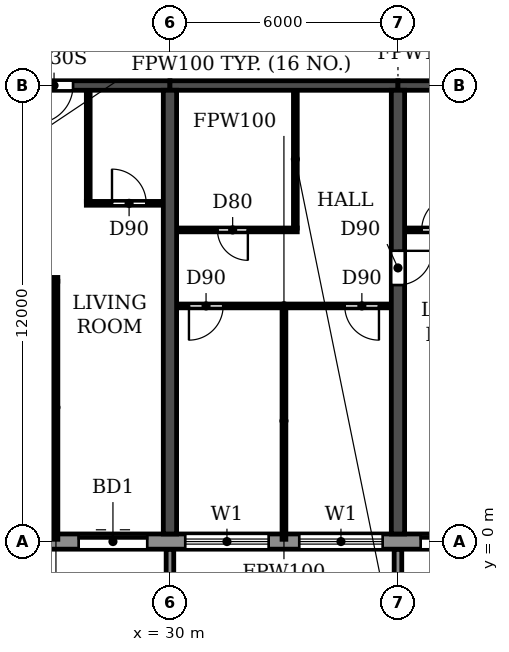
"""IFC4 building model, lengths in metres.
Left out: names, types, materials, properties, quantities, classifications, styles, units other than length and angle.
Written with IfcOpenShell. Run it as: python <this file> out.ifc"""

import sys

from ifc_helpers import new_model, si_unit, direction, frame, frame_2d, origin, place, context, subcontext, project, spatial, polyline, rectangle, outline, extrude, source, transform, mapped, element, fill, save


model = new_model("IFC4")
c1 = context("Model", 3, precision=1e-05, world=origin(), true_north=direction((0.0, 1.0)))
c2 = subcontext(c1, "Body", "Model", "MODEL_VIEW")
j1 = project(units=[si_unit("LENGTHUNIT", "METRE"), si_unit("PLANEANGLEUNIT", "RADIAN")], contexts=[c1])
p1 = place(None, origin())
s1 = spatial("IfcSite", under=j1, at=p1, CompositionType="ELEMENT")
p2 = place(p1, origin())
s2 = spatial("IfcBuilding", under=s1, at=p2, CompositionType="ELEMENT")
p3 = place(p2, frame((0.0, 0.0, 72.9)))
s3 = spatial("IfcBuildingStorey", under=s2, at=p3, CompositionType="ELEMENT", Elevation=72.9)
p4 = place(p3, frame((30.0, 0.2, 0.0), z_axis=(0.0, 0.0, 1.0), x_axis=(0.0, 1.0, 0.0)))
e1 = element("IfcWall", 1, at=p4, inside=s3, PredefinedType="SHEAR", context=c2, shape_type="SweptSolid", body=[
    extrude(rectangle(XDim=11.675, YDim=0.35, at=frame_2d((5.837, 0.0))), origin(), (0.0, 0.0, 1.0), 3.06),
])
p5 = place(p3, frame((36.0, 0.2, 0.0), z_axis=(0.0, 0.0, 1.0), x_axis=(0.0, 1.0, 0.0)))
e2 = element("IfcWall", 2, at=p5, inside=s3, PredefinedType="SHEAR", context=c2, shape_type="SweptSolid", body=[
    extrude(rectangle(XDim=11.675, YDim=0.35, at=frame_2d((5.837, 0.0))), origin(), (0.0, 0.0, 1.0), 3.06),
])
p6 = place(p5, frame((6.55, 0.0, 0.0)))
e3 = element("IfcOpeningElement", 3, at=p6, cuts=e2, PredefinedType="OPENING", context=c2, shape_type="SweptSolid", body=[
    extrude(rectangle(XDim=0.9, YDim=2.1, at=frame_2d((0.45, 1.05))), frame((0.0, 0.185, 0.0), z_axis=(0.0, -1.0, 0.0), x_axis=(1.0, 0.0, 0.0)), (0.0, 0.0, 1.0), 0.37),
])
p7 = place(p3, frame((24.0, 12.0, 0.0), z_axis=(0.0, 0.0, 1.0), x_axis=(1.0, 0.0, 0.0)))
e4 = element("IfcWall", 4, at=p7, inside=s3, PredefinedType="SHEAR", context=c2, shape_type="SweptSolid", body=[
    extrude(rectangle(XDim=6.0, YDim=0.25, at=frame_2d((3.0, 0.0))), origin(), (0.0, 0.0, 1.0), 2.46),
])
p8 = place(p7, frame((2.45, 0.0, 0.0)))
e5 = element("IfcOpeningElement", 5, at=p8, cuts=e4, PredefinedType="OPENING", context=c2, shape_type="SweptSolid", body=[
    extrude(rectangle(XDim=1.0, YDim=2.1, at=frame_2d((0.5, 1.05))), frame((0.0, 0.135, 0.0), z_axis=(0.0, -1.0, 0.0), x_axis=(1.0, 0.0, 0.0)), (0.0, 0.0, 1.0), 0.27),
])
p9 = place(p3, frame((30.0, 12.0, 0.0), z_axis=(0.0, 0.0, 1.0), x_axis=(1.0, 0.0, 0.0)))
e6 = element("IfcWall", 6, at=p9, inside=s3, PredefinedType="SHEAR", context=c2, shape_type="SweptSolid", body=[
    extrude(rectangle(XDim=6.0, YDim=0.25, at=frame_2d((3.0, 0.0))), origin(), (0.0, 0.0, 1.0), 2.46),
])
p10 = place(p3, frame((36.0, 12.0, 0.0), z_axis=(0.0, 0.0, 1.0), x_axis=(1.0, 0.0, 0.0)))
e7 = element("IfcWall", 7, at=p10, inside=s3, PredefinedType="SHEAR", context=c2, shape_type="SweptSolid", body=[
    extrude(rectangle(XDim=6.0, YDim=0.25, at=frame_2d((3.0, 0.0))), origin(), (0.0, 0.0, 1.0), 2.46),
])
p11 = place(p10, frame((2.55, 0.0, 0.0)))
e8 = element("IfcOpeningElement", 8, at=p11, cuts=e7, PredefinedType="OPENING", context=c2, shape_type="SweptSolid", body=[
    extrude(rectangle(XDim=1.0, YDim=2.1, at=frame_2d((0.5, 1.05))), frame((0.0, 0.135, 0.0), z_axis=(0.0, -1.0, 0.0), x_axis=(1.0, 0.0, 0.0)), (0.0, 0.0, 1.0), 0.27),
])
p12 = place(p3, frame((10.683, 0.0, 0.0), z_axis=(0.0, 0.0, 1.0), x_axis=(1.0, 0.0, 0.0)))
e9 = element("IfcWall", 9, at=p12, inside=s3, PredefinedType="STANDARD", context=c2, shape_type="SweptSolid", body=[
    extrude(rectangle(XDim=80.634, YDim=0.4, at=frame_2d((40.317, 0.0))), origin(), (0.0, 0.0, 1.0), 3.06),
])
p13 = place(p12, frame((1.717, 0.0, 0.9)))
e10 = element("IfcOpeningElement", 10, at=p13, cuts=e9, PredefinedType="OPENING", context=c2, shape_type="SweptSolid", body=[
    extrude(rectangle(XDim=2.2, YDim=1.5, at=frame_2d((1.1, 0.75))), frame((0.0, 0.21, 0.0), z_axis=(0.0, -1.0, 0.0), x_axis=(1.0, 0.0, 0.0)), (0.0, 0.0, 1.0), 0.42),
])
p14 = place(p12, frame((4.917, 0.0, 0.0)))
e11 = element("IfcOpeningElement", 11, at=p14, cuts=e9, PredefinedType="OPENING", context=c2, shape_type="SweptSolid", body=[
    extrude(rectangle(XDim=1.8, YDim=2.4, at=frame_2d((0.9, 1.2))), frame((0.0, 0.21, 0.0), z_axis=(0.0, -1.0, 0.0), x_axis=(1.0, 0.0, 0.0)), (0.0, 0.0, 1.0), 0.42),
])
p15 = place(p12, frame((7.717, 0.0, 0.9)))
e12 = element("IfcOpeningElement", 12, at=p15, cuts=e9, PredefinedType="OPENING", context=c2, shape_type="SweptSolid", body=[
    extrude(rectangle(XDim=2.2, YDim=1.5, at=frame_2d((1.1, 0.75))), frame((0.0, 0.21, 0.0), z_axis=(0.0, -1.0, 0.0), x_axis=(1.0, 0.0, 0.0)), (0.0, 0.0, 1.0), 0.42),
])
p16 = place(p12, frame((10.717, 0.0, 0.9)))
e13 = element("IfcOpeningElement", 13, at=p16, cuts=e9, PredefinedType="OPENING", context=c2, shape_type="SweptSolid", body=[
    extrude(rectangle(XDim=2.2, YDim=1.5, at=frame_2d((1.1, 0.75))), frame((0.0, 0.21, 0.0), z_axis=(0.0, -1.0, 0.0), x_axis=(1.0, 0.0, 0.0)), (0.0, 0.0, 1.0), 0.42),
])
p17 = place(p12, frame((13.717, 0.0, 0.9)))
e14 = element("IfcOpeningElement", 14, at=p17, cuts=e9, PredefinedType="OPENING", context=c2, shape_type="SweptSolid", body=[
    extrude(rectangle(XDim=2.2, YDim=1.5, at=frame_2d((1.1, 0.75))), frame((0.0, 0.21, 0.0), z_axis=(0.0, -1.0, 0.0), x_axis=(1.0, 0.0, 0.0)), (0.0, 0.0, 1.0), 0.42),
])
p18 = place(p12, frame((16.917, 0.0, 0.0)))
e15 = element("IfcOpeningElement", 15, at=p18, cuts=e9, PredefinedType="OPENING", context=c2, shape_type="SweptSolid", body=[
    extrude(rectangle(XDim=1.8, YDim=2.4, at=frame_2d((0.9, 1.2))), frame((0.0, 0.21, 0.0), z_axis=(0.0, -1.0, 0.0), x_axis=(1.0, 0.0, 0.0)), (0.0, 0.0, 1.0), 0.42),
])
p19 = place(p12, frame((19.717, 0.0, 0.9)))
e16 = element("IfcOpeningElement", 16, at=p19, cuts=e9, PredefinedType="OPENING", context=c2, shape_type="SweptSolid", body=[
    extrude(rectangle(XDim=2.2, YDim=1.5, at=frame_2d((1.1, 0.75))), frame((0.0, 0.21, 0.0), z_axis=(0.0, -1.0, 0.0), x_axis=(1.0, 0.0, 0.0)), (0.0, 0.0, 1.0), 0.42),
])
p20 = place(p12, frame((22.717, 0.0, 0.9)))
e17 = element("IfcOpeningElement", 17, at=p20, cuts=e9, PredefinedType="OPENING", context=c2, shape_type="SweptSolid", body=[
    extrude(rectangle(XDim=2.2, YDim=1.5, at=frame_2d((1.1, 0.75))), frame((0.0, 0.21, 0.0), z_axis=(0.0, -1.0, 0.0), x_axis=(1.0, 0.0, 0.0)), (0.0, 0.0, 1.0), 0.42),
])
p21 = place(p12, frame((25.917, 0.0, 0.0)))
e18 = element("IfcOpeningElement", 18, at=p21, cuts=e9, PredefinedType="OPENING", context=c2, shape_type="SweptSolid", body=[
    extrude(rectangle(XDim=1.8, YDim=2.4, at=frame_2d((0.9, 1.2))), frame((0.0, 0.21, 0.0), z_axis=(0.0, -1.0, 0.0), x_axis=(1.0, 0.0, 0.0)), (0.0, 0.0, 1.0), 0.42),
])
p22 = place(p12, frame((28.717, 0.0, 0.9)))
e19 = element("IfcOpeningElement", 19, at=p22, cuts=e9, PredefinedType="OPENING", context=c2, shape_type="SweptSolid", body=[
    extrude(rectangle(XDim=2.2, YDim=1.5, at=frame_2d((1.1, 0.75))), frame((0.0, 0.21, 0.0), z_axis=(0.0, -1.0, 0.0), x_axis=(1.0, 0.0, 0.0)), (0.0, 0.0, 1.0), 0.42),
])
p23 = place(p12, frame((31.717, 0.0, 0.9)))
e20 = element("IfcOpeningElement", 20, at=p23, cuts=e9, PredefinedType="OPENING", context=c2, shape_type="SweptSolid", body=[
    extrude(rectangle(XDim=2.2, YDim=1.5, at=frame_2d((1.1, 0.75))), frame((0.0, 0.21, 0.0), z_axis=(0.0, -1.0, 0.0), x_axis=(1.0, 0.0, 0.0)), (0.0, 0.0, 1.0), 0.42),
])
p24 = place(p12, frame((34.717, 0.0, 0.9)))
e21 = element("IfcOpeningElement", 21, at=p24, cuts=e9, PredefinedType="OPENING", context=c2, shape_type="SweptSolid", body=[
    extrude(rectangle(XDim=2.2, YDim=1.5, at=frame_2d((1.1, 0.75))), frame((0.0, 0.21, 0.0), z_axis=(0.0, -1.0, 0.0), x_axis=(1.0, 0.0, 0.0)), (0.0, 0.0, 1.0), 0.42),
])
p25 = place(p12, frame((37.917, 0.0, 0.0)))
e22 = element("IfcOpeningElement", 22, at=p25, cuts=e9, PredefinedType="OPENING", context=c2, shape_type="SweptSolid", body=[
    extrude(rectangle(XDim=1.8, YDim=2.4, at=frame_2d((0.9, 1.2))), frame((0.0, 0.21, 0.0), z_axis=(0.0, -1.0, 0.0), x_axis=(1.0, 0.0, 0.0)), (0.0, 0.0, 1.0), 0.42),
])
p26 = place(p12, frame((40.717, 0.0, 0.9)))
e23 = element("IfcOpeningElement", 23, at=p26, cuts=e9, PredefinedType="OPENING", context=c2, shape_type="SweptSolid", body=[
    extrude(rectangle(XDim=2.2, YDim=1.5, at=frame_2d((1.1, 0.75))), frame((0.0, 0.21, 0.0), z_axis=(0.0, -1.0, 0.0), x_axis=(1.0, 0.0, 0.0)), (0.0, 0.0, 1.0), 0.42),
])
p27 = place(p12, frame((43.717, 0.0, 0.9)))
e24 = element("IfcOpeningElement", 24, at=p27, cuts=e9, PredefinedType="OPENING", context=c2, shape_type="SweptSolid", body=[
    extrude(rectangle(XDim=2.2, YDim=1.5, at=frame_2d((1.1, 0.75))), frame((0.0, 0.21, 0.0), z_axis=(0.0, -1.0, 0.0), x_axis=(1.0, 0.0, 0.0)), (0.0, 0.0, 1.0), 0.42),
])
p28 = place(p12, frame((46.717, 0.0, 0.9)))
e25 = element("IfcOpeningElement", 25, at=p28, cuts=e9, PredefinedType="OPENING", context=c2, shape_type="SweptSolid", body=[
    extrude(rectangle(XDim=2.2, YDim=1.5, at=frame_2d((1.1, 0.75))), frame((0.0, 0.21, 0.0), z_axis=(0.0, -1.0, 0.0), x_axis=(1.0, 0.0, 0.0)), (0.0, 0.0, 1.0), 0.42),
])
p29 = place(p12, frame((49.917, 0.0, 0.0)))
e26 = element("IfcOpeningElement", 26, at=p29, cuts=e9, PredefinedType="OPENING", context=c2, shape_type="SweptSolid", body=[
    extrude(rectangle(XDim=1.8, YDim=2.4, at=frame_2d((0.9, 1.2))), frame((0.0, 0.21, 0.0), z_axis=(0.0, -1.0, 0.0), x_axis=(1.0, 0.0, 0.0)), (0.0, 0.0, 1.0), 0.42),
])
p30 = place(p12, frame((52.717, 0.0, 0.9)))
e27 = element("IfcOpeningElement", 27, at=p30, cuts=e9, PredefinedType="OPENING", context=c2, shape_type="SweptSolid", body=[
    extrude(rectangle(XDim=2.2, YDim=1.5, at=frame_2d((1.1, 0.75))), frame((0.0, 0.21, 0.0), z_axis=(0.0, -1.0, 0.0), x_axis=(1.0, 0.0, 0.0)), (0.0, 0.0, 1.0), 0.42),
])
p31 = place(p12, frame((55.717, 0.0, 0.9)))
e28 = element("IfcOpeningElement", 28, at=p31, cuts=e9, PredefinedType="OPENING", context=c2, shape_type="SweptSolid", body=[
    extrude(rectangle(XDim=2.2, YDim=1.5, at=frame_2d((1.1, 0.75))), frame((0.0, 0.21, 0.0), z_axis=(0.0, -1.0, 0.0), x_axis=(1.0, 0.0, 0.0)), (0.0, 0.0, 1.0), 0.42),
])
p32 = place(p12, frame((58.717, 0.0, 0.9)))
e29 = element("IfcOpeningElement", 29, at=p32, cuts=e9, PredefinedType="OPENING", context=c2, shape_type="SweptSolid", body=[
    extrude(rectangle(XDim=2.2, YDim=1.5, at=frame_2d((1.1, 0.75))), frame((0.0, 0.21, 0.0), z_axis=(0.0, -1.0, 0.0), x_axis=(1.0, 0.0, 0.0)), (0.0, 0.0, 1.0), 0.42),
])
p33 = place(p12, frame((61.717, 0.0, 0.9)))
e30 = element("IfcOpeningElement", 30, at=p33, cuts=e9, PredefinedType="OPENING", context=c2, shape_type="SweptSolid", body=[
    extrude(rectangle(XDim=2.2, YDim=1.5, at=frame_2d((1.1, 0.75))), frame((0.0, 0.21, 0.0), z_axis=(0.0, -1.0, 0.0), x_axis=(1.0, 0.0, 0.0)), (0.0, 0.0, 1.0), 0.42),
])
p34 = place(p12, frame((64.917, 0.0, 0.0)))
e31 = element("IfcOpeningElement", 31, at=p34, cuts=e9, PredefinedType="OPENING", context=c2, shape_type="SweptSolid", body=[
    extrude(rectangle(XDim=1.8, YDim=2.4, at=frame_2d((0.9, 1.2))), frame((0.0, 0.21, 0.0), z_axis=(0.0, -1.0, 0.0), x_axis=(1.0, 0.0, 0.0)), (0.0, 0.0, 1.0), 0.42),
])
p35 = place(p12, frame((67.717, 0.0, 0.9)))
e32 = element("IfcOpeningElement", 32, at=p35, cuts=e9, PredefinedType="OPENING", context=c2, shape_type="SweptSolid", body=[
    extrude(rectangle(XDim=2.2, YDim=1.5, at=frame_2d((1.1, 0.75))), frame((0.0, 0.21, 0.0), z_axis=(0.0, -1.0, 0.0), x_axis=(1.0, 0.0, 0.0)), (0.0, 0.0, 1.0), 0.42),
])
p36 = place(p12, frame((70.717, 0.0, 0.9)))
e33 = element("IfcOpeningElement", 33, at=p36, cuts=e9, PredefinedType="OPENING", context=c2, shape_type="SweptSolid", body=[
    extrude(rectangle(XDim=2.2, YDim=1.5, at=frame_2d((1.1, 0.75))), frame((0.0, 0.21, 0.0), z_axis=(0.0, -1.0, 0.0), x_axis=(1.0, 0.0, 0.0)), (0.0, 0.0, 1.0), 0.42),
])
p37 = place(p12, frame((73.917, 0.0, 0.0)))
e34 = element("IfcOpeningElement", 34, at=p37, cuts=e9, PredefinedType="OPENING", context=c2, shape_type="SweptSolid", body=[
    extrude(rectangle(XDim=1.8, YDim=2.4, at=frame_2d((0.9, 1.2))), frame((0.0, 0.21, 0.0), z_axis=(0.0, -1.0, 0.0), x_axis=(1.0, 0.0, 0.0)), (0.0, 0.0, 1.0), 0.42),
])
p38 = place(p12, frame((76.717, 0.0, 0.9)))
e35 = element("IfcOpeningElement", 35, at=p38, cuts=e9, PredefinedType="OPENING", context=c2, shape_type="SweptSolid", body=[
    extrude(rectangle(XDim=2.2, YDim=1.5, at=frame_2d((1.1, 0.75))), frame((0.0, 0.21, 0.0), z_axis=(0.0, -1.0, 0.0), x_axis=(1.0, 0.0, 0.0)), (0.0, 0.0, 1.0), 0.42),
])
m1 = source(origin(), c2, "Body", "SweptSolid", [
    extrude(outline(polyline([(0.0, 0.0), (0.2, 0.0), (0.2, 1.65), (0.0, 1.65), (0.0, 0.0)])), origin(), (0.0, 0.0, 1.0), 3.1),
])
for number, where in (
    (36, (29.9, -1.85, 0.0)),
    (37, (35.9, -1.85, 0.0)),
):
    element("IfcWall", number, at=place(p3, frame(where)), inside=s3, PredefinedType="STANDARD", context=c2, shape_type="MappedRepresentation", body=[
        mapped(m1, transform((0.0, 0.0, 0.0))),
    ])
p39 = place(p3, frame((30.185, 6.2, 0.0), z_axis=(0.0, 0.0, 1.0), x_axis=(1.0, 0.0, 0.0)))
e38 = element("IfcWall", 38, at=p39, inside=s3, PredefinedType="PARTITIONING", context=c2, shape_type="SweptSolid", body=[
    extrude(rectangle(XDim=5.63, YDim=0.1, at=frame_2d((2.815, 0.0))), origin(), (0.0, 0.0, 1.0), 3.06),
])
p40 = place(p39, frame((0.315, 0.0, 0.0)))
e39 = element("IfcOpeningElement", 39, at=p40, cuts=e38, PredefinedType="OPENING", context=c2, shape_type="SweptSolid", body=[
    extrude(rectangle(XDim=0.9, YDim=2.1, at=frame_2d((0.45, 1.05))), frame((0.0, 0.06, 0.0), z_axis=(0.0, -1.0, 0.0), x_axis=(1.0, 0.0, 0.0)), (0.0, 0.0, 1.0), 0.12),
])
p41 = place(p39, frame((4.415, 0.0, 0.0)))
e40 = element("IfcOpeningElement", 40, at=p41, cuts=e38, PredefinedType="OPENING", context=c2, shape_type="SweptSolid", body=[
    extrude(rectangle(XDim=0.9, YDim=2.1, at=frame_2d((0.45, 1.05))), frame((0.0, 0.06, 0.0), z_axis=(0.0, -1.0, 0.0), x_axis=(1.0, 0.0, 0.0)), (0.0, 0.0, 1.0), 0.12),
])
p42 = place(p3, frame((24.185, 6.9, 0.0), z_axis=(0.0, 0.0, 1.0), x_axis=(1.0, 0.0, 0.0)))
e41 = element("IfcWall", 41, at=p42, inside=s3, PredefinedType="PARTITIONING", context=c2, shape_type="SweptSolid", body=[
    extrude(rectangle(XDim=2.865, YDim=0.1, at=frame_2d((1.433, 0.0))), origin(), (0.0, 0.0, 1.0), 3.06),
])
p43 = place(p42, frame((1.415, 0.0, 0.0)))
e42 = element("IfcOpeningElement", 42, at=p43, cuts=e41, PredefinedType="OPENING", context=c2, shape_type="SweptSolid", body=[
    extrude(rectangle(XDim=0.9, YDim=2.1, at=frame_2d((0.45, 1.05))), frame((0.0, 0.06, 0.0), z_axis=(0.0, -1.0, 0.0), x_axis=(1.0, 0.0, 0.0)), (0.0, 0.0, 1.0), 0.12),
])
p44 = place(p3, frame((30.185, 8.2, 0.0), z_axis=(0.0, 0.0, 1.0), x_axis=(1.0, 0.0, 0.0)))
e43 = element("IfcWall", 43, at=p44, inside=s3, PredefinedType="PARTITIONING", context=c2, shape_type="SweptSolid", body=[
    extrude(rectangle(XDim=3.165, YDim=0.1, at=frame_2d((1.583, 0.0))), origin(), (0.0, 0.0, 1.0), 3.06),
])
p45 = place(p44, frame((1.065, 0.0, 0.0)))
e44 = element("IfcOpeningElement", 44, at=p45, cuts=e43, PredefinedType="OPENING", context=c2, shape_type="SweptSolid", body=[
    extrude(rectangle(XDim=0.8, YDim=2.1, at=frame_2d((0.4, 1.05))), frame((0.0, 0.06, 0.0), z_axis=(0.0, -1.0, 0.0), x_axis=(1.0, 0.0, 0.0)), (0.0, 0.0, 1.0), 0.12),
])
p46 = place(p3, frame((36.185, 8.2, 0.0), z_axis=(0.0, 0.0, 1.0), x_axis=(1.0, 0.0, 0.0)))
e45 = element("IfcWall", 45, at=p46, inside=s3, PredefinedType="PARTITIONING", context=c2, shape_type="SweptSolid", body=[
    extrude(rectangle(XDim=2.015, YDim=0.1, at=frame_2d((1.007, 0.0))), origin(), (0.0, 0.0, 1.0), 3.06),
])
p47 = place(p46, frame((0.44, 0.0, 0.0)))
e46 = element("IfcOpeningElement", 46, at=p47, cuts=e45, PredefinedType="OPENING", context=c2, shape_type="SweptSolid", body=[
    extrude(rectangle(XDim=0.9, YDim=2.1, at=frame_2d((0.45, 1.05))), frame((0.0, 0.06, 0.0), z_axis=(0.0, -1.0, 0.0), x_axis=(1.0, 0.0, 0.0)), (0.0, 0.0, 1.0), 0.12),
])
p48 = place(p3, frame((27.8, 8.9, 0.0), z_axis=(0.0, 0.0, 1.0), x_axis=(1.0, 0.0, 0.0)))
e47 = element("IfcWall", 47, at=p48, inside=s3, PredefinedType="PARTITIONING", context=c2, shape_type="SweptSolid", body=[
    extrude(rectangle(XDim=2.015, YDim=0.1, at=frame_2d((1.007, 0.0))), origin(), (0.0, 0.0, 1.0), 3.06),
])
p49 = place(p48, frame((0.675, 0.0, 0.0)))
e48 = element("IfcOpeningElement", 48, at=p49, cuts=e47, PredefinedType="OPENING", context=c2, shape_type="SweptSolid", body=[
    extrude(rectangle(XDim=0.9, YDim=2.1, at=frame_2d((0.45, 1.05))), frame((0.0, 0.06, 0.0), z_axis=(0.0, -1.0, 0.0), x_axis=(1.0, 0.0, 0.0)), (0.0, 0.0, 1.0), 0.12),
])
p50 = place(p3, frame((27.0, 0.06, 0.0), z_axis=(0.0, 0.0, 1.0), x_axis=(0.0, 1.0, 0.0)))
e49 = element("IfcWall", 49, at=p50, inside=s3, PredefinedType="PARTITIONING", context=c2, shape_type="SweptSolid", body=[
    extrude(rectangle(XDim=6.79, YDim=0.1, at=frame_2d((3.395, 0.0))), origin(), (0.0, 0.0, 1.0), 3.06),
])
p51 = place(p3, frame((27.85, 8.95, 0.0), z_axis=(0.0, 0.0, 1.0), x_axis=(0.0, 1.0, 0.0)))
e50 = element("IfcWall", 50, at=p51, inside=s3, PredefinedType="PARTITIONING", context=c2, shape_type="SweptSolid", body=[
    extrude(rectangle(XDim=2.915, YDim=0.1, at=frame_2d((1.458, 0.0))), origin(), (0.0, 0.0, 1.0), 3.06),
])
p52 = place(p3, frame((33.0, 0.06, 0.0), z_axis=(0.0, 0.0, 1.0), x_axis=(0.0, 1.0, 0.0)))
e51 = element("IfcWall", 51, at=p52, inside=s3, PredefinedType="PARTITIONING", context=c2, shape_type="SweptSolid", body=[
    extrude(rectangle(XDim=6.09, YDim=0.1, at=frame_2d((3.045, 0.0))), origin(), (0.0, 0.0, 1.0), 3.06),
])
p53 = place(p3, frame((33.3, 8.25, 0.0), z_axis=(0.0, 0.0, 1.0), x_axis=(0.0, 1.0, 0.0)))
e52 = element("IfcWall", 52, at=p53, inside=s3, PredefinedType="PARTITIONING", context=c2, shape_type="SweptSolid", body=[
    extrude(rectangle(XDim=3.615, YDim=0.1, at=frame_2d((1.808, 0.0))), origin(), (0.0, 0.0, 1.0), 3.06),
])
p54 = place(p18, origin())
e53 = element("IfcDoor", 53, at=p54, inside=s3, OperationType="DOUBLE_DOOR_SLIDING", PredefinedType="DOOR", context=c2, shape_type="SweptSolid", body=[
    extrude(rectangle(XDim=1.8, YDim=2.4, at=frame_2d((0.9, 1.2))), frame((0.0, 0.025, 0.0), z_axis=(0.0, -1.0, 0.0), x_axis=(1.0, 0.0, 0.0)), (0.0, 0.0, 1.0), 0.05),
])
fill(e15, e53)
p55 = place(p19, origin())
e54 = element("IfcWindow", 54, at=p55, inside=s3, PartitioningType="DOUBLE_PANEL_HORIZONTAL", PredefinedType="WINDOW", context=c2, shape_type="SweptSolid", body=[
    extrude(rectangle(XDim=2.2, YDim=1.5, at=frame_2d((1.1, 0.75))), frame((0.0, 0.03, 0.0), z_axis=(0.0, -1.0, 0.0), x_axis=(1.0, 0.0, 0.0)), (0.0, 0.0, 1.0), 0.06),
])
fill(e16, e54)
p56 = place(p20, origin())
e55 = element("IfcWindow", 55, at=p56, inside=s3, PartitioningType="DOUBLE_PANEL_HORIZONTAL", PredefinedType="WINDOW", context=c2, shape_type="SweptSolid", body=[
    extrude(rectangle(XDim=2.2, YDim=1.5, at=frame_2d((1.1, 0.75))), frame((0.0, 0.03, 0.0), z_axis=(0.0, -1.0, 0.0), x_axis=(1.0, 0.0, 0.0)), (0.0, 0.0, 1.0), 0.06),
])
fill(e17, e55)
p57 = place(p21, origin())
e56 = element("IfcDoor", 56, at=p57, inside=s3, OperationType="DOUBLE_DOOR_SLIDING", PredefinedType="DOOR", context=c2, shape_type="SweptSolid", body=[
    extrude(rectangle(XDim=1.8, YDim=2.4, at=frame_2d((0.9, 1.2))), frame((0.0, 0.025, 0.0), z_axis=(0.0, -1.0, 0.0), x_axis=(1.0, 0.0, 0.0)), (0.0, 0.0, 1.0), 0.05),
])
fill(e18, e56)
p58 = place(p8, frame((1.0, 0.0, 0.0), z_axis=(0.0, 0.0, 1.0), x_axis=(-1.0, 0.0, 0.0)))
e57 = element("IfcDoor", 57, at=p58, inside=s3, OperationType="SINGLE_SWING_RIGHT", PredefinedType="DOOR", context=c2, shape_type="SweptSolid", body=[
    extrude(rectangle(XDim=1.0, YDim=2.1, at=frame_2d((0.5, 1.05))), frame((0.0, 0.025, 0.0), z_axis=(0.0, -1.0, 0.0), x_axis=(1.0, 0.0, 0.0)), (0.0, 0.0, 1.0), 0.05),
])
fill(e5, e57)
p59 = place(p49, origin())
e58 = element("IfcDoor", 58, at=p59, inside=s3, OperationType="SINGLE_SWING_LEFT", PredefinedType="DOOR", context=c2, shape_type="SweptSolid", body=[
    extrude(rectangle(XDim=0.9, YDim=2.1, at=frame_2d((0.45, 1.05))), frame((0.0, 0.025, 0.0), z_axis=(0.0, -1.0, 0.0), x_axis=(1.0, 0.0, 0.0)), (0.0, 0.0, 1.0), 0.05),
])
fill(e48, e58)
p60 = place(p40, frame((0.9, 0.0, 0.0), z_axis=(0.0, 0.0, 1.0), x_axis=(-1.0, 0.0, 0.0)))
e59 = element("IfcDoor", 59, at=p60, inside=s3, OperationType="SINGLE_SWING_RIGHT", PredefinedType="DOOR", context=c2, shape_type="SweptSolid", body=[
    extrude(rectangle(XDim=0.9, YDim=2.1, at=frame_2d((0.45, 1.05))), frame((0.0, 0.025, 0.0), z_axis=(0.0, -1.0, 0.0), x_axis=(1.0, 0.0, 0.0)), (0.0, 0.0, 1.0), 0.05),
])
fill(e39, e59)
p61 = place(p45, frame((0.8, 0.0, 0.0), z_axis=(0.0, 0.0, 1.0), x_axis=(-1.0, 0.0, 0.0)))
e60 = element("IfcDoor", 60, at=p61, inside=s3, OperationType="SINGLE_SWING_LEFT", PredefinedType="DOOR", context=c2, shape_type="SweptSolid", body=[
    extrude(rectangle(XDim=0.8, YDim=2.1, at=frame_2d((0.4, 1.05))), frame((0.0, 0.025, 0.0), z_axis=(0.0, -1.0, 0.0), x_axis=(1.0, 0.0, 0.0)), (0.0, 0.0, 1.0), 0.05),
])
fill(e44, e60)
p62 = place(p41, frame((0.9, 0.0, 0.0), z_axis=(0.0, 0.0, 1.0), x_axis=(-1.0, 0.0, 0.0)))
e61 = element("IfcDoor", 61, at=p62, inside=s3, OperationType="SINGLE_SWING_LEFT", PredefinedType="DOOR", context=c2, shape_type="SweptSolid", body=[
    extrude(rectangle(XDim=0.9, YDim=2.1, at=frame_2d((0.45, 1.05))), frame((0.0, 0.025, 0.0), z_axis=(0.0, -1.0, 0.0), x_axis=(1.0, 0.0, 0.0)), (0.0, 0.0, 1.0), 0.05),
])
fill(e40, e61)
p63 = place(p6, frame((0.9, 0.0, 0.0), z_axis=(0.0, 0.0, 1.0), x_axis=(-1.0, 0.0, 0.0)))
e62 = element("IfcDoor", 62, at=p63, inside=s3, OperationType="SINGLE_SWING_LEFT", PredefinedType="DOOR", context=c2, shape_type="SweptSolid", body=[
    extrude(rectangle(XDim=0.9, YDim=2.1, at=frame_2d((0.45, 1.05))), frame((0.0, 0.025, 0.0), z_axis=(0.0, -1.0, 0.0), x_axis=(1.0, 0.0, 0.0)), (0.0, 0.0, 1.0), 0.05),
])
fill(e3, e62)
p64 = place(p47, origin())
e63 = element("IfcDoor", 63, at=p64, inside=s3, OperationType="SINGLE_SWING_RIGHT", PredefinedType="DOOR", context=c2, shape_type="SweptSolid", body=[
    extrude(rectangle(XDim=0.9, YDim=2.1, at=frame_2d((0.45, 1.05))), frame((0.0, 0.025, 0.0), z_axis=(0.0, -1.0, 0.0), x_axis=(1.0, 0.0, 0.0)), (0.0, 0.0, 1.0), 0.05),
])
fill(e46, e63)
save(model, sys.argv[1])
